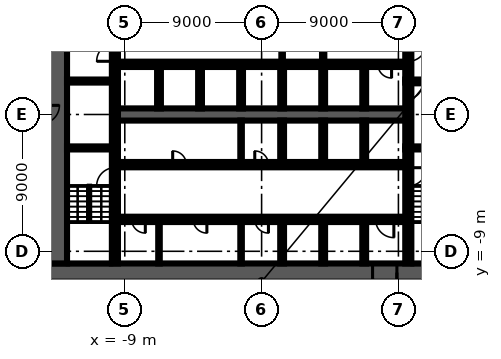
"""IFC4 building model, lengths in metres.
Left out: names, types, materials, properties, quantities, classifications, styles, units other than length and angle.
Written with IfcOpenShell. Run it as: python <this file> out.ifc"""

import sys

from ifc_helpers import new_model, si_unit, direction, frame, frame_2d, origin, place, context, subcontext, project, spatial, rectangle, extrude, element, fill, save


model = new_model("IFC4")
c1 = context("Model", 3, precision=1e-05, world=origin(), true_north=direction((0.0, 1.0)))
c2 = subcontext(c1, "Body", "Model", "MODEL_VIEW")
j1 = project(units=[si_unit("LENGTHUNIT", "METRE"), si_unit("PLANEANGLEUNIT", "RADIAN")], contexts=[c1])
p1 = place(None, origin())
s1 = spatial("IfcSite", under=j1, at=p1, CompositionType="ELEMENT")
p2 = place(p1, origin())
s2 = spatial("IfcBuilding", under=s1, at=p2, CompositionType="ELEMENT")
p3 = place(p2, frame((0.0, 0.0, -17.0)))
s3 = spatial("IfcBuildingStorey", under=s2, at=p3, CompositionType="ELEMENT", Elevation=-17.0)
p4 = place(p3, frame((14.0, -10.4, 0.0), z_axis=(0.0, 0.0, 1.0), x_axis=(-1.0, 0.0, 0.0)))
e1 = element("IfcWall", 1, at=p4, inside=s3, PredefinedType="SHEAR", context=c2, shape_type="SweptSolid", body=[
    extrude(rectangle(XDim=28.0, YDim=1.2, at=frame_2d((14.0, 0.0))), origin(), (0.0, 0.0, 1.0), 5.1),
])
p5 = place(p4, frame((5.1, 0.0, 0.0)))
e2 = element("IfcOpeningElement", 2, at=p5, cuts=e1, PredefinedType="OPENING", context=c2, shape_type="SweptSolid", body=[
    extrude(rectangle(XDim=1.6, YDim=2.1, at=frame_2d((0.8, 1.05))), frame((0.0, 0.61, 0.0), z_axis=(0.0, -1.0, 0.0), x_axis=(1.0, 0.0, 0.0)), (0.0, 0.0, 1.0), 1.22),
])
p6 = place(p3, frame((-13.4, -9.8, 0.0), z_axis=(0.0, 0.0, 1.0), x_axis=(0.0, 1.0, 0.0)))
e3 = element("IfcWall", 3, at=p6, inside=s3, PredefinedType="SHEAR", context=c2, shape_type="SweptSolid", body=[
    extrude(rectangle(XDim=19.6, YDim=1.2, at=frame_2d((9.8, 0.0))), origin(), (0.0, 0.0, 1.0), 5.1),
])
p7 = place(p3, frame((9.65, -2.3, 0.0), z_axis=(0.0, 0.0, 1.0), x_axis=(0.0, -1.0, 0.0)))
e4 = element("IfcWall", 4, at=p7, inside=s3, PredefinedType="SHEAR", context=c2, shape_type="SweptSolid", body=[
    extrude(rectangle(XDim=7.5, YDim=0.4, at=frame_2d((3.75, 0.0))), origin(), (0.0, 0.0, 1.0), 5.1),
])
p8 = place(p7, frame((1.2, 0.0, 0.0)))
e5 = element("IfcOpeningElement", 5, at=p8, cuts=e4, PredefinedType="OPENING", context=c2, shape_type="SweptSolid", body=[
    extrude(rectangle(XDim=1.2, YDim=2.1, at=frame_2d((0.6, 1.05))), frame((0.0, 0.21, 0.0), z_axis=(0.0, -1.0, 0.0), x_axis=(1.0, 0.0, 0.0)), (0.0, 0.0, 1.0), 0.42),
])
p9 = place(p3, frame((9.65, 2.1, 0.0), z_axis=(0.0, 0.0, 1.0), x_axis=(0.0, -1.0, 0.0)))
e6 = element("IfcWall", 6, at=p9, inside=s3, PredefinedType="SHEAR", context=c2, shape_type="SweptSolid", body=[
    extrude(rectangle(XDim=4.2, YDim=0.4, at=frame_2d((2.1, 0.0))), origin(), (0.0, 0.0, 1.0), 5.1),
])
p10 = place(p9, frame((0.15, 0.0, 0.0)))
e7 = element("IfcOpeningElement", 7, at=p10, cuts=e6, PredefinedType="OPENING", context=c2, shape_type="SweptSolid", body=[
    extrude(rectangle(XDim=0.9, YDim=2.1, at=frame_2d((0.45, 1.05))), frame((0.0, 0.21, 0.0), z_axis=(0.0, -1.0, 0.0), x_axis=(1.0, 0.0, 0.0)), (0.0, 0.0, 1.0), 0.42),
])
p11 = place(p3, frame((9.65, 9.8, 0.0), z_axis=(0.0, 0.0, 1.0), x_axis=(0.0, -1.0, 0.0)))
e8 = element("IfcWall", 8, at=p11, inside=s3, PredefinedType="SHEAR", context=c2, shape_type="SweptSolid", body=[
    extrude(rectangle(XDim=7.5, YDim=0.4, at=frame_2d((3.75, 0.0))), origin(), (0.0, 0.0, 1.0), 5.1),
])
p12 = place(p11, frame((5.1, 0.0, 0.0)))
e9 = element("IfcOpeningElement", 9, at=p12, cuts=e8, PredefinedType="OPENING", context=c2, shape_type="SweptSolid", body=[
    extrude(rectangle(XDim=1.2, YDim=2.1, at=frame_2d((0.6, 1.05))), frame((0.0, 0.21, 0.0), z_axis=(0.0, -1.0, 0.0), x_axis=(1.0, 0.0, 0.0)), (0.0, 0.0, 1.0), 0.42),
])
p13 = place(p3, frame((-9.65, -9.8, 0.0), z_axis=(0.0, 0.0, 1.0), x_axis=(0.0, 1.0, 0.0)))
e10 = element("IfcWall", 10, at=p13, inside=s3, PredefinedType="SHEAR", context=c2, shape_type="SweptSolid", body=[
    extrude(rectangle(XDim=7.5, YDim=0.4, at=frame_2d((3.75, 0.0))), origin(), (0.0, 0.0, 1.0), 5.1),
])
p14 = place(p13, frame((5.1, 0.0, 0.0)))
e11 = element("IfcOpeningElement", 11, at=p14, cuts=e10, PredefinedType="OPENING", context=c2, shape_type="SweptSolid", body=[
    extrude(rectangle(XDim=1.2, YDim=2.1, at=frame_2d((0.6, 1.05))), frame((0.0, 0.21, 0.0), z_axis=(0.0, -1.0, 0.0), x_axis=(1.0, 0.0, 0.0)), (0.0, 0.0, 1.0), 0.42),
])
p15 = place(p3, frame((-9.65, -2.1, 0.0), z_axis=(0.0, 0.0, 1.0), x_axis=(0.0, 1.0, 0.0)))
e12 = element("IfcWall", 12, at=p15, inside=s3, PredefinedType="SHEAR", context=c2, shape_type="SweptSolid", body=[
    extrude(rectangle(XDim=4.2, YDim=0.4, at=frame_2d((2.1, 0.0))), origin(), (0.0, 0.0, 1.0), 5.1),
])
p16 = place(p3, frame((-9.65, 2.3, 0.0), z_axis=(0.0, 0.0, 1.0), x_axis=(0.0, 1.0, 0.0)))
e13 = element("IfcWall", 13, at=p16, inside=s3, PredefinedType="SHEAR", context=c2, shape_type="SweptSolid", body=[
    extrude(rectangle(XDim=7.5, YDim=0.4, at=frame_2d((3.75, 0.0))), origin(), (0.0, 0.0, 1.0), 5.1),
])
p17 = place(p16, frame((1.2, 0.0, 0.0)))
e14 = element("IfcOpeningElement", 14, at=p17, cuts=e13, PredefinedType="OPENING", context=c2, shape_type="SweptSolid", body=[
    extrude(rectangle(XDim=1.2, YDim=2.1, at=frame_2d((0.6, 1.05))), frame((0.0, 0.21, 0.0), z_axis=(0.0, -1.0, 0.0), x_axis=(1.0, 0.0, 0.0)), (0.0, 0.0, 1.0), 0.42),
])
for number, where, z_axis, x_axis in (
    (15, (9.45, 2.2, 0.0), (0.0, 0.0, 1.0), (1.0, 0.0, 0.0)),
    (16, (-9.45, 2.2, 0.0), (0.0, 0.0, 1.0), (-1.0, 0.0, 0.0)),
    (17, (9.45, -2.2, 0.0), (0.0, 0.0, 1.0), (1.0, 0.0, 0.0)),
    (18, (-9.45, -2.2, 0.0), (0.0, 0.0, 1.0), (-1.0, 0.0, 0.0)),
):
    element("IfcWall", number, at=place(p3, frame(where, z_axis=z_axis, x_axis=x_axis)), inside=s3, PredefinedType="SHEAR", context=c2, shape_type="SweptSolid", body=[
        extrude(rectangle(XDim=3.35, YDim=0.2, at=frame_2d((1.675, 0.0))), origin(), (0.0, 0.0, 1.0), 5.1),
    ])
p18 = place(p3, frame((9.45, 3.3, 0.0), z_axis=(0.0, 0.0, 1.0), x_axis=(-1.0, 0.0, 0.0)))
e19 = element("IfcWall", 19, at=p18, inside=s3, PredefinedType="SHEAR", context=c2, shape_type="SweptSolid", body=[
    extrude(rectangle(XDim=18.9, YDim=0.35, at=frame_2d((9.45, 0.0))), origin(), (0.0, 0.0, 1.0), 5.1),
])
p19 = place(p18, frame((6.2, 0.0, 0.0)))
e20 = element("IfcOpeningElement", 20, at=p19, cuts=e19, PredefinedType="OPENING", context=c2, shape_type="SweptSolid", body=[
    extrude(rectangle(XDim=1.1, YDim=2.1, at=frame_2d((0.55, 1.05))), frame((0.0, 0.185, 0.0), z_axis=(0.0, -1.0, 0.0), x_axis=(1.0, 0.0, 0.0)), (0.0, 0.0, 1.0), 0.37),
])
p20 = place(p18, frame((3.5, 0.0, 0.0)))
e21 = element("IfcOpeningElement", 21, at=p20, cuts=e19, PredefinedType="OPENING", context=c2, shape_type="SweptSolid", body=[
    extrude(rectangle(XDim=1.1, YDim=2.1, at=frame_2d((0.55, 1.05))), frame((0.0, 0.185, 0.0), z_axis=(0.0, -1.0, 0.0), x_axis=(1.0, 0.0, 0.0)), (0.0, 0.0, 1.0), 0.37),
])
p21 = place(p18, frame((0.9, 0.0, 0.0)))
e22 = element("IfcOpeningElement", 22, at=p21, cuts=e19, PredefinedType="OPENING", context=c2, shape_type="SweptSolid", body=[
    extrude(rectangle(XDim=0.9, YDim=2.1, at=frame_2d((0.45, 1.05))), frame((0.0, 0.185, 0.0), z_axis=(0.0, -1.0, 0.0), x_axis=(1.0, 0.0, 0.0)), (0.0, 0.0, 1.0), 0.37),
])
p22 = place(p3, frame((-9.45, -3.3, 0.0), z_axis=(0.0, 0.0, 1.0), x_axis=(1.0, 0.0, 0.0)))
e23 = element("IfcWall", 23, at=p22, inside=s3, PredefinedType="SHEAR", context=c2, shape_type="SweptSolid", body=[
    extrude(rectangle(XDim=18.9, YDim=0.35, at=frame_2d((9.45, 0.0))), origin(), (0.0, 0.0, 1.0), 5.1),
])
p23 = place(p22, frame((17.0, 0.0, 0.0)))
e24 = element("IfcOpeningElement", 24, at=p23, cuts=e23, PredefinedType="OPENING", context=c2, shape_type="SweptSolid", body=[
    extrude(rectangle(XDim=1.1, YDim=2.1, at=frame_2d((0.55, 1.05))), frame((0.0, 0.185, 0.0), z_axis=(0.0, -1.0, 0.0), x_axis=(1.0, 0.0, 0.0)), (0.0, 0.0, 1.0), 0.37),
])
p24 = place(p22, frame((3.6, 0.0, 0.0)))
e25 = element("IfcOpeningElement", 25, at=p24, cuts=e23, PredefinedType="OPENING", context=c2, shape_type="SweptSolid", body=[
    extrude(rectangle(XDim=0.9, YDim=2.1, at=frame_2d((0.45, 1.05))), frame((0.0, 0.185, 0.0), z_axis=(0.0, -1.0, 0.0), x_axis=(1.0, 0.0, 0.0)), (0.0, 0.0, 1.0), 0.37),
])
p25 = place(p22, frame((9.0, 0.0, 0.0)))
e26 = element("IfcOpeningElement", 26, at=p25, cuts=e23, PredefinedType="OPENING", context=c2, shape_type="SweptSolid", body=[
    extrude(rectangle(XDim=0.9, YDim=2.1, at=frame_2d((0.45, 1.05))), frame((0.0, 0.185, 0.0), z_axis=(0.0, -1.0, 0.0), x_axis=(1.0, 0.0, 0.0)), (0.0, 0.0, 1.0), 0.37),
])
p26 = place(p3, frame((9.45, -6.9, 0.0), z_axis=(0.0, 0.0, 1.0), x_axis=(-1.0, 0.0, 0.0)))
e27 = element("IfcWall", 27, at=p26, inside=s3, PredefinedType="SHEAR", context=c2, shape_type="SweptSolid", body=[
    extrude(rectangle(XDim=18.9, YDim=0.35, at=frame_2d((9.45, 0.0))), origin(), (0.0, 0.0, 1.0), 5.1),
])
p27 = place(p26, frame((0.75, 0.0, 0.0)))
e28 = element("IfcOpeningElement", 28, at=p27, cuts=e27, PredefinedType="OPENING", context=c2, shape_type="SweptSolid", body=[
    extrude(rectangle(XDim=1.2, YDim=2.1, at=frame_2d((0.6, 1.05))), frame((0.0, 0.185, 0.0), z_axis=(0.0, -1.0, 0.0), x_axis=(1.0, 0.0, 0.0)), (0.0, 0.0, 1.0), 0.37),
])
p28 = place(p26, frame((17.1, 0.0, 0.0)))
e29 = element("IfcOpeningElement", 29, at=p28, cuts=e27, PredefinedType="OPENING", context=c2, shape_type="SweptSolid", body=[
    extrude(rectangle(XDim=0.9, YDim=2.1, at=frame_2d((0.45, 1.05))), frame((0.0, 0.185, 0.0), z_axis=(0.0, -1.0, 0.0), x_axis=(1.0, 0.0, 0.0)), (0.0, 0.0, 1.0), 0.37),
])
p29 = place(p26, frame((13.05, 0.0, 0.0)))
e30 = element("IfcOpeningElement", 30, at=p29, cuts=e27, PredefinedType="OPENING", context=c2, shape_type="SweptSolid", body=[
    extrude(rectangle(XDim=0.9, YDim=2.1, at=frame_2d((0.45, 1.05))), frame((0.0, 0.185, 0.0), z_axis=(0.0, -1.0, 0.0), x_axis=(1.0, 0.0, 0.0)), (0.0, 0.0, 1.0), 0.37),
])
p30 = place(p26, frame((9.0, 0.0, 0.0)))
e31 = element("IfcOpeningElement", 31, at=p30, cuts=e27, PredefinedType="OPENING", context=c2, shape_type="SweptSolid", body=[
    extrude(rectangle(XDim=0.9, YDim=2.1, at=frame_2d((0.45, 1.05))), frame((0.0, 0.185, 0.0), z_axis=(0.0, -1.0, 0.0), x_axis=(1.0, 0.0, 0.0)), (0.0, 0.0, 1.0), 0.37),
])
p31 = place(p3, frame((-9.45, 0.0, 0.0), z_axis=(0.0, 0.0, 1.0), x_axis=(1.0, 0.0, 0.0)))
e32 = element("IfcWall", 32, at=p31, inside=s3, PredefinedType="SHEAR", context=c2, shape_type="SweptSolid", body=[
    extrude(rectangle(XDim=18.9, YDim=0.8, at=frame_2d((9.45, 0.0))), origin(), (0.0, 0.0, 1.0), 5.1),
])
for number, where, z_axis, x_axis in (
    (33, (6.75, -9.8, 0.0), (0.0, 0.0, 1.0), (0.0, 1.0, 0.0)),
    (34, (6.75, -3.125, 0.0), (0.0, 0.0, 1.0), (0.0, 1.0, 0.0)),
):
    element("IfcWall", number, at=place(p3, frame(where, z_axis=z_axis, x_axis=x_axis)), inside=s3, PredefinedType="SHEAR", context=c2, shape_type="SweptSolid", body=[
        extrude(rectangle(XDim=2.725, YDim=0.25, at=frame_2d((1.363, 0.0))), origin(), (0.0, 0.0, 1.0), 5.1),
    ])
p32 = place(p3, frame((6.75, 0.4, 0.0), z_axis=(0.0, 0.0, 1.0), x_axis=(0.0, 1.0, 0.0)))
e35 = element("IfcWall", 35, at=p32, inside=s3, PredefinedType="SOLIDWALL", context=c2, shape_type="SweptSolid", body=[
    extrude(rectangle(XDim=2.725, YDim=0.25, at=frame_2d((1.363, 0.0))), origin(), (0.0, 0.0, 1.0), 5.1),
])
p33 = place(p3, frame((4.05, 6.725, 0.0), z_axis=(0.0, 0.0, 1.0), x_axis=(0.0, -1.0, 0.0)))
e36 = element("IfcWall", 36, at=p33, inside=s3, PredefinedType="PARTITIONING", context=c2, shape_type="SweptSolid", body=[
    extrude(rectangle(XDim=3.25, YDim=0.15, at=frame_2d((1.625, 0.0))), origin(), (0.0, 0.0, 1.0), 5.1),
])
p34 = place(p33, frame((1.025, 0.0, 0.0)))
e37 = element("IfcOpeningElement", 37, at=p34, cuts=e36, PredefinedType="OPENING", context=c2, shape_type="SweptSolid", body=[
    extrude(rectangle(XDim=1.2, YDim=2.1, at=frame_2d((0.6, 1.05))), frame((0.0, 0.085, 0.0), z_axis=(0.0, -1.0, 0.0), x_axis=(1.0, 0.0, 0.0)), (0.0, 0.0, 1.0), 0.17),
])
for number, where, z_axis, x_axis in (
    (38, (4.05, -9.8, 0.0), (0.0, 0.0, 1.0), (0.0, 1.0, 0.0)),
    (39, (4.05, -3.125, 0.0), (0.0, 0.0, 1.0), (0.0, 1.0, 0.0)),
):
    element("IfcWall", number, at=place(p3, frame(where, z_axis=z_axis, x_axis=x_axis)), inside=s3, PredefinedType="SHEAR", context=c2, shape_type="SweptSolid", body=[
        extrude(rectangle(XDim=2.725, YDim=0.25, at=frame_2d((1.363, 0.0))), origin(), (0.0, 0.0, 1.0), 5.1),
    ])
p35 = place(p3, frame((4.05, 0.4, 0.0), z_axis=(0.0, 0.0, 1.0), x_axis=(0.0, 1.0, 0.0)))
e40 = element("IfcWall", 40, at=p35, inside=s3, PredefinedType="SOLIDWALL", context=c2, shape_type="SweptSolid", body=[
    extrude(rectangle(XDim=2.725, YDim=0.25, at=frame_2d((1.363, 0.0))), origin(), (0.0, 0.0, 1.0), 5.1),
])
p36 = place(p3, frame((1.35, 6.725, 0.0), z_axis=(0.0, 0.0, 1.0), x_axis=(0.0, -1.0, 0.0)))
e41 = element("IfcWall", 41, at=p36, inside=s3, PredefinedType="PARTITIONING", context=c2, shape_type="SweptSolid", body=[
    extrude(rectangle(XDim=3.25, YDim=0.1, at=frame_2d((1.625, 0.0))), origin(), (0.0, 0.0, 1.0), 5.1),
])
p37 = place(p36, frame((1.025, 0.0, 0.0)))
e42 = element("IfcOpeningElement", 42, at=p37, cuts=e41, PredefinedType="OPENING", context=c2, shape_type="SweptSolid", body=[
    extrude(rectangle(XDim=1.2, YDim=2.1, at=frame_2d((0.6, 1.05))), frame((0.0, 0.06, 0.0), z_axis=(0.0, -1.0, 0.0), x_axis=(1.0, 0.0, 0.0)), (0.0, 0.0, 1.0), 0.12),
])
for number, where, z_axis, x_axis in (
    (43, (1.35, -9.8, 0.0), (0.0, 0.0, 1.0), (0.0, 1.0, 0.0)),
    (44, (1.35, -3.125, 0.0), (0.0, 0.0, 1.0), (0.0, 1.0, 0.0)),
    (45, (1.35, 0.4, 0.0), (0.0, 0.0, 1.0), (0.0, 1.0, 0.0)),
):
    element("IfcWall", number, at=place(p3, frame(where, z_axis=z_axis, x_axis=x_axis)), inside=s3, PredefinedType="SHEAR", context=c2, shape_type="SweptSolid", body=[
        extrude(rectangle(XDim=2.725, YDim=0.25, at=frame_2d((1.363, 0.0))), origin(), (0.0, 0.0, 1.0), 5.1),
    ])
for number, where, z_axis, x_axis in (
    (46, (-1.35, -9.8, 0.0), (0.0, 0.0, 1.0), (0.0, 1.0, 0.0)),
    (47, (-1.35, -3.125, 0.0), (0.0, 0.0, 1.0), (0.0, 1.0, 0.0)),
):
    element("IfcWall", number, at=place(p3, frame(where, z_axis=z_axis, x_axis=x_axis)), inside=s3, PredefinedType="PARTITIONING", context=c2, shape_type="SweptSolid", body=[
        extrude(rectangle(XDim=2.725, YDim=0.1, at=frame_2d((1.363, 0.0))), origin(), (0.0, 0.0, 1.0), 5.1),
    ])
for number, where, z_axis, x_axis in (
    (48, (-1.35, 0.4, 0.0), (0.0, 0.0, 1.0), (0.0, 1.0, 0.0)),
    (49, (-4.05, 0.4, 0.0), (0.0, 0.0, 1.0), (0.0, 1.0, 0.0)),
):
    element("IfcWall", number, at=place(p3, frame(where, z_axis=z_axis, x_axis=x_axis)), inside=s3, PredefinedType="SHEAR", context=c2, shape_type="SweptSolid", body=[
        extrude(rectangle(XDim=2.725, YDim=0.25, at=frame_2d((1.363, 0.0))), origin(), (0.0, 0.0, 1.0), 5.1),
    ])
p38 = place(p3, frame((-6.75, -9.8, 0.0), z_axis=(0.0, 0.0, 1.0), x_axis=(0.0, 1.0, 0.0)))
e50 = element("IfcWall", 50, at=p38, inside=s3, PredefinedType="PARTITIONING", context=c2, shape_type="SweptSolid", body=[
    extrude(rectangle(XDim=2.725, YDim=0.1, at=frame_2d((1.363, 0.0))), origin(), (0.0, 0.0, 1.0), 5.1),
])
p39 = place(p3, frame((-6.75, 0.4, 0.0), z_axis=(0.0, 0.0, 1.0), x_axis=(0.0, 1.0, 0.0)))
e51 = element("IfcWall", 51, at=p39, inside=s3, PredefinedType="SHEAR", context=c2, shape_type="SweptSolid", body=[
    extrude(rectangle(XDim=2.725, YDim=0.25, at=frame_2d((1.363, 0.0))), origin(), (0.0, 0.0, 1.0), 5.1),
])
p40 = place(p10, origin())
e52 = element("IfcDoor", 52, at=p40, inside=s3, OperationType="SINGLE_SWING_RIGHT", PredefinedType="DOOR", context=c2, shape_type="SweptSolid", body=[
    extrude(rectangle(XDim=0.9, YDim=2.1, at=frame_2d((0.45, 1.05))), frame((0.0, 0.025, 0.0), z_axis=(0.0, -1.0, 0.0), x_axis=(1.0, 0.0, 0.0)), (0.0, 0.0, 1.0), 0.05),
])
fill(e7, e52)
p41 = place(p19, origin())
e53 = element("IfcDoor", 53, at=p41, inside=s3, OperationType="DOUBLE_DOOR_SLIDING", PredefinedType="DOOR", context=c2, shape_type="SweptSolid", body=[
    extrude(rectangle(XDim=1.1, YDim=2.1, at=frame_2d((0.55, 1.05))), frame((0.0, 0.025, 0.0), z_axis=(0.0, -1.0, 0.0), x_axis=(1.0, 0.0, 0.0)), (0.0, 0.0, 1.0), 0.05),
])
fill(e20, e53)
p42 = place(p20, origin())
e54 = element("IfcDoor", 54, at=p42, inside=s3, OperationType="DOUBLE_DOOR_SLIDING", PredefinedType="DOOR", context=c2, shape_type="SweptSolid", body=[
    extrude(rectangle(XDim=1.1, YDim=2.1, at=frame_2d((0.55, 1.05))), frame((0.0, 0.025, 0.0), z_axis=(0.0, -1.0, 0.0), x_axis=(1.0, 0.0, 0.0)), (0.0, 0.0, 1.0), 0.05),
])
fill(e21, e54)
p43 = place(p21, origin())
e55 = element("IfcDoor", 55, at=p43, inside=s3, OperationType="SINGLE_SWING_LEFT", PredefinedType="DOOR", context=c2, shape_type="SweptSolid", body=[
    extrude(rectangle(XDim=0.9, YDim=2.1, at=frame_2d((0.45, 1.05))), frame((0.0, 0.025, 0.0), z_axis=(0.0, -1.0, 0.0), x_axis=(1.0, 0.0, 0.0)), (0.0, 0.0, 1.0), 0.05),
])
fill(e22, e55)
p44 = place(p23, origin())
e56 = element("IfcDoor", 56, at=p44, inside=s3, OperationType="DOUBLE_DOOR_SLIDING", PredefinedType="DOOR", context=c2, shape_type="SweptSolid", body=[
    extrude(rectangle(XDim=1.1, YDim=2.1, at=frame_2d((0.55, 1.05))), frame((0.0, 0.025, 0.0), z_axis=(0.0, -1.0, 0.0), x_axis=(1.0, 0.0, 0.0)), (0.0, 0.0, 1.0), 0.05),
])
fill(e24, e56)
p45 = place(p5, origin())
e57 = element("IfcDoor", 57, at=p45, inside=s3, OperationType="DOUBLE_DOOR_SINGLE_SWING", PredefinedType="DOOR", context=c2, shape_type="SweptSolid", body=[
    extrude(rectangle(XDim=1.6, YDim=2.1, at=frame_2d((0.8, 1.05))), frame((0.0, 0.025, 0.0), z_axis=(0.0, -1.0, 0.0), x_axis=(1.0, 0.0, 0.0)), (0.0, 0.0, 1.0), 0.05),
])
fill(e2, e57)
p46 = place(p27, origin())
e58 = element("IfcDoor", 58, at=p46, inside=s3, OperationType="SINGLE_SWING_LEFT", PredefinedType="DOOR", context=c2, shape_type="SweptSolid", body=[
    extrude(rectangle(XDim=1.2, YDim=2.1, at=frame_2d((0.6, 1.05))), frame((0.0, 0.025, 0.0), z_axis=(0.0, -1.0, 0.0), x_axis=(1.0, 0.0, 0.0)), (0.0, 0.0, 1.0), 0.05),
])
fill(e28, e58)
p47 = place(p24, origin())
e59 = element("IfcDoor", 59, at=p47, inside=s3, OperationType="SINGLE_SWING_RIGHT", PredefinedType="DOOR", context=c2, shape_type="SweptSolid", body=[
    extrude(rectangle(XDim=0.9, YDim=2.1, at=frame_2d((0.45, 1.05))), frame((0.0, 0.025, 0.0), z_axis=(0.0, -1.0, 0.0), x_axis=(1.0, 0.0, 0.0)), (0.0, 0.0, 1.0), 0.05),
])
fill(e25, e59)
p48 = place(p25, origin())
e60 = element("IfcDoor", 60, at=p48, inside=s3, OperationType="SINGLE_SWING_LEFT", PredefinedType="DOOR", context=c2, shape_type="SweptSolid", body=[
    extrude(rectangle(XDim=0.9, YDim=2.1, at=frame_2d((0.45, 1.05))), frame((0.0, 0.025, 0.0), z_axis=(0.0, -1.0, 0.0), x_axis=(1.0, 0.0, 0.0)), (0.0, 0.0, 1.0), 0.05),
])
fill(e26, e60)
p49 = place(p28, origin())
e61 = element("IfcDoor", 61, at=p49, inside=s3, OperationType="SINGLE_SWING_RIGHT", PredefinedType="DOOR", context=c2, shape_type="SweptSolid", body=[
    extrude(rectangle(XDim=0.9, YDim=2.1, at=frame_2d((0.45, 1.05))), frame((0.0, 0.025, 0.0), z_axis=(0.0, -1.0, 0.0), x_axis=(1.0, 0.0, 0.0)), (0.0, 0.0, 1.0), 0.05),
])
fill(e29, e61)
p50 = place(p29, origin())
e62 = element("IfcDoor", 62, at=p50, inside=s3, OperationType="SINGLE_SWING_LEFT", PredefinedType="DOOR", context=c2, shape_type="SweptSolid", body=[
    extrude(rectangle(XDim=0.9, YDim=2.1, at=frame_2d((0.45, 1.05))), frame((0.0, 0.025, 0.0), z_axis=(0.0, -1.0, 0.0), x_axis=(1.0, 0.0, 0.0)), (0.0, 0.0, 1.0), 0.05),
])
fill(e30, e62)
p51 = place(p30, origin())
e63 = element("IfcDoor", 63, at=p51, inside=s3, OperationType="SINGLE_SWING_RIGHT", PredefinedType="DOOR", context=c2, shape_type="SweptSolid", body=[
    extrude(rectangle(XDim=0.9, YDim=2.1, at=frame_2d((0.45, 1.05))), frame((0.0, 0.025, 0.0), z_axis=(0.0, -1.0, 0.0), x_axis=(1.0, 0.0, 0.0)), (0.0, 0.0, 1.0), 0.05),
])
fill(e31, e63)
p52 = place(p12, origin())
e64 = element("IfcDoor", 64, at=p52, inside=s3, OperationType="SINGLE_SWING_LEFT", PredefinedType="DOOR", context=c2, shape_type="SweptSolid", body=[
    extrude(rectangle(XDim=1.2, YDim=2.1, at=frame_2d((0.6, 1.05))), frame((0.0, 0.025, 0.0), z_axis=(0.0, -1.0, 0.0), x_axis=(1.0, 0.0, 0.0)), (0.0, 0.0, 1.0), 0.05),
])
fill(e9, e64)
p53 = place(p17, origin())
e65 = element("IfcDoor", 65, at=p53, inside=s3, OperationType="SINGLE_SWING_RIGHT", PredefinedType="DOOR", context=c2, shape_type="SweptSolid", body=[
    extrude(rectangle(XDim=1.2, YDim=2.1, at=frame_2d((0.6, 1.05))), frame((0.0, 0.025, 0.0), z_axis=(0.0, -1.0, 0.0), x_axis=(1.0, 0.0, 0.0)), (0.0, 0.0, 1.0), 0.05),
])
fill(e14, e65)
p54 = place(p8, origin())
e66 = element("IfcDoor", 66, at=p54, inside=s3, OperationType="SINGLE_SWING_RIGHT", PredefinedType="DOOR", context=c2, shape_type="SweptSolid", body=[
    extrude(rectangle(XDim=1.2, YDim=2.1, at=frame_2d((0.6, 1.05))), frame((0.0, 0.025, 0.0), z_axis=(0.0, -1.0, 0.0), x_axis=(1.0, 0.0, 0.0)), (0.0, 0.0, 1.0), 0.05),
])
fill(e5, e66)
p55 = place(p14, origin())
e67 = element("IfcDoor", 67, at=p55, inside=s3, OperationType="SINGLE_SWING_LEFT", PredefinedType="DOOR", context=c2, shape_type="SweptSolid", body=[
    extrude(rectangle(XDim=1.2, YDim=2.1, at=frame_2d((0.6, 1.05))), frame((0.0, 0.025, 0.0), z_axis=(0.0, -1.0, 0.0), x_axis=(1.0, 0.0, 0.0)), (0.0, 0.0, 1.0), 0.05),
])
fill(e11, e67)
save(model, sys.argv[1])
